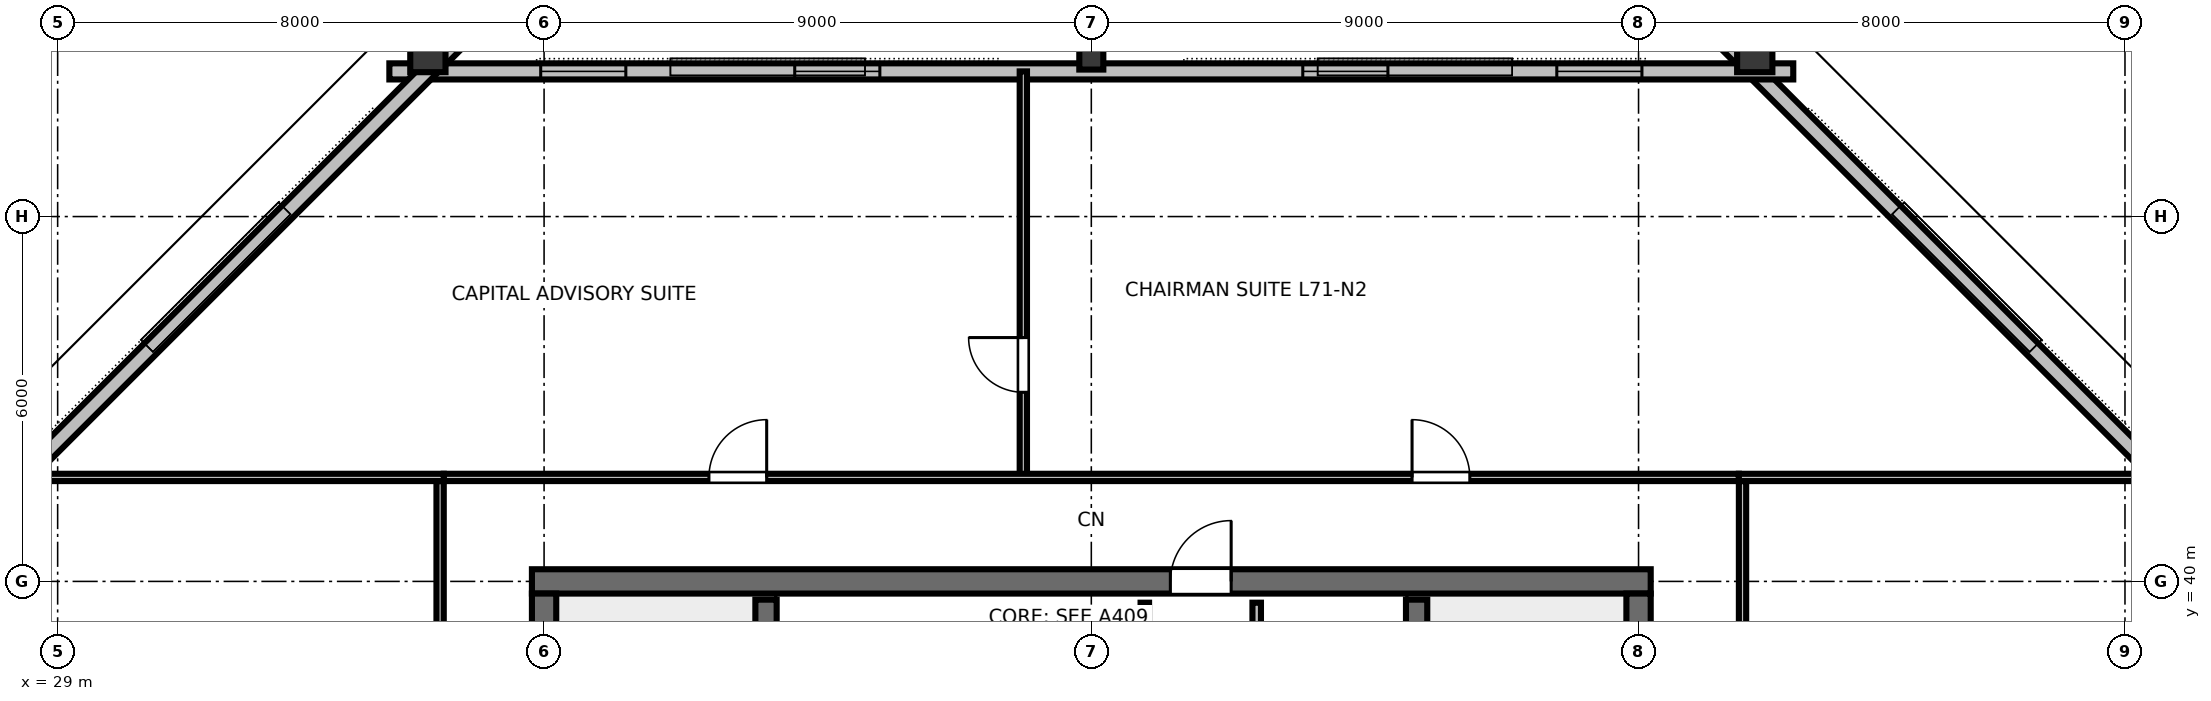
"""IFC4 building model, lengths in metres.
Left out: names, types, materials, properties, quantities, classifications, styles, units other than length and angle.
Written with IfcOpenShell. Run it as: python <this file> out.ifc"""

import sys

from ifc_helpers import new_model, si_unit, direction, frame, frame_2d, origin, origin_2d, place, context, subcontext, project, spatial, rectangle, hollow_rectangle, i_section, extrude, element, fill, save


model = new_model("IFC4")
c1 = context("Model", 3, precision=1e-05, world=origin(), true_north=direction((0.0, 1.0)))
c2 = subcontext(c1, "Body", "Model", "MODEL_VIEW")
j1 = project(units=[si_unit("LENGTHUNIT", "METRE"), si_unit("PLANEANGLEUNIT", "RADIAN")], contexts=[c1])
p1 = place(None, origin())
s1 = spatial("IfcSite", under=j1, at=p1, CompositionType="ELEMENT")
p2 = place(p1, origin())
s2 = spatial("IfcBuilding", under=s1, at=p2, CompositionType="ELEMENT")
p3 = place(p2, frame((0.0, 0.0, 268.2)))
s3 = spatial("IfcBuildingStorey", under=s2, at=p3, CompositionType="ELEMENT", Elevation=268.2)
p4 = place(p3, frame((36.8, 40.0, 0.0), z_axis=(0.0, 0.0, 1.0), x_axis=(1.0, 0.0, 0.0)))
e1 = element("IfcWall", 1, at=p4, inside=s3, PredefinedType="SHEAR", context=c2, shape_type="SweptSolid", body=[
    extrude(rectangle(XDim=18.4, YDim=0.4, at=frame_2d((9.2, 0.0))), origin(), (0.0, 0.0, 1.0), 3.36),
])
p5 = place(p4, frame((10.5, 0.0, 0.0)))
e2 = element("IfcOpeningElement", 2, at=p5, cuts=e1, PredefinedType="OPENING", context=c2, shape_type="SweptSolid", body=[
    extrude(rectangle(XDim=1.0, YDim=2.15, at=frame_2d((0.5, 1.075))), frame((0.0, 0.21, 0.0), z_axis=(0.0, -1.0, 0.0), x_axis=(1.0, 0.0, 0.0)), (0.0, 0.0, 1.0), 0.42),
])
p6 = place(p3, frame((37.0, 24.2, 0.0), z_axis=(0.0, 0.0, 1.0), x_axis=(0.0, 1.0, 0.0)))
e3 = element("IfcWall", 3, at=p6, inside=s3, PredefinedType="SHEAR", context=c2, shape_type="SweptSolid", body=[
    extrude(rectangle(XDim=15.6, YDim=0.4, at=frame_2d((7.8, 0.0))), origin(), (0.0, 0.0, 1.0), 3.36),
])
p7 = place(p6, frame((5.325, 0.0, 0.0)))
e4 = element("IfcOpeningElement", 4, at=p7, cuts=e3, PredefinedType="OPENING", context=c2, shape_type="SweptSolid", body=[
    extrude(rectangle(XDim=1.15, YDim=2.15, at=frame_2d((0.575, 1.075))), frame((0.0, 0.21, 0.0), z_axis=(0.0, -1.0, 0.0), x_axis=(1.0, 0.0, 0.0)), (0.0, 0.0, 1.0), 0.42),
])
p8 = place(p3, frame((55.0, 24.2, 0.0), z_axis=(0.0, 0.0, 1.0), x_axis=(0.0, 1.0, 0.0)))
e5 = element("IfcWall", 5, at=p8, inside=s3, PredefinedType="SHEAR", context=c2, shape_type="SweptSolid", body=[
    extrude(rectangle(XDim=15.6, YDim=0.4, at=frame_2d((7.8, 0.0))), origin(), (0.0, 0.0, 1.0), 3.36),
])
p9 = place(p8, frame((5.325, 0.0, 0.0)))
e6 = element("IfcOpeningElement", 6, at=p9, cuts=e5, PredefinedType="OPENING", context=c2, shape_type="SweptSolid", body=[
    extrude(rectangle(XDim=1.15, YDim=2.15, at=frame_2d((0.575, 1.075))), frame((0.0, 0.21, 0.0), z_axis=(0.0, -1.0, 0.0), x_axis=(1.0, 0.0, 0.0)), (0.0, 0.0, 1.0), 0.42),
])
p10 = place(p3, frame((64.086, 41.572, 0.0), z_axis=(-0.177666210098, -0.155370015085, 0.971748360535), x_axis=(0.731494530151, 0.639695731236, 0.236019329289)))
e7 = element("IfcColumn", 7, at=p10, inside=s3, PredefinedType="COLUMN", context=c2, shape_type="SweptSolid", body=[
    extrude(hollow_rectangle(XDim=0.58, YDim=0.7, WallThickness=0.032, at=origin_2d()), origin(), (0.0, 0.0, 1.0), 3.471),
])
p11 = place(p3, frame((56.911, 48.724, 0.0), z_axis=(-0.204686751755, -0.127630689066, 0.97047088615), x_axis=(0.529108691454, -0.848554059932, 0.0)))
e8 = element("IfcColumn", 8, at=p11, inside=s3, PredefinedType="COLUMN", context=c2, shape_type="SweptSolid", body=[
    extrude(hollow_rectangle(XDim=0.58, YDim=0.7, WallThickness=0.032, at=origin_2d()), origin(), (0.0, 0.0, 1.0), 3.476),
])
p12 = place(p3, frame((46.0, 48.607, 0.0), z_axis=(0.0, -0.128344855493, 0.99172959927), x_axis=(1.0, 0.0, 0.0)))
e9 = element("IfcColumn", 9, at=p12, inside=s3, PredefinedType="COLUMN", context=c2, shape_type="SweptSolid", body=[
    extrude(i_section(OverallWidth=0.395, OverallDepth=0.38, WebThickness=0.019, FlangeThickness=0.03, FilletRadius=0.025, at=origin_2d()), origin(), (0.0, 0.0, 1.0), 3.401),
])
p13 = place(p3, frame((35.089, 48.724, 0.0), z_axis=(0.204686751755, -0.127630689066, 0.97047088615), x_axis=(0.529108691454, 0.848554059932, 0.0)))
e10 = element("IfcColumn", 10, at=p13, inside=s3, PredefinedType="COLUMN", context=c2, shape_type="SweptSolid", body=[
    extrude(hollow_rectangle(XDim=0.58, YDim=0.7, WallThickness=0.032, at=origin_2d()), origin(), (0.0, 0.0, 1.0), 3.476),
])
p14 = place(p3, frame((27.914, 41.572, 0.0), z_axis=(0.177666210098, -0.155370015085, 0.971748360535), x_axis=(-0.731494530151, 0.639695731236, 0.236019329289)))
e11 = element("IfcColumn", 11, at=p14, inside=s3, PredefinedType="COLUMN", context=c2, shape_type="SweptSolid", body=[
    extrude(hollow_rectangle(XDim=0.58, YDim=0.7, WallThickness=0.032, at=origin_2d()), origin(), (0.0, 0.0, 1.0), 3.471),
])
p15 = place(p3, frame((64.228, 41.075, 0.0), z_axis=(0.0, 0.0, 1.0), x_axis=(-0.707106781187, 0.707106781187, 0.0)))
e12 = element("IfcWall", 12, at=p15, inside=s3, PredefinedType="STANDARD", context=c2, shape_type="SweptSolid", body=[
    extrude(rectangle(XDim=10.971, YDim=0.265, at=frame_2d((5.485, 0.0))), origin(), (0.0, 0.0, 1.0), 3.375),
])
p16 = place(p3, frame((57.544, 48.387, 0.0), z_axis=(0.0, 0.0, 1.0), x_axis=(-1.0, 0.0, 0.0)))
e13 = element("IfcWall", 13, at=p16, inside=s3, PredefinedType="STANDARD", context=c2, shape_type="SweptSolid", body=[
    extrude(rectangle(XDim=23.089, YDim=0.265, at=frame_2d((11.544, 0.0))), origin(), (0.0, 0.0, 1.0), 2.832),
])
p17 = place(p16, frame((2.489, 0.0, 0.85)))
e14 = element("IfcOpeningElement", 14, at=p17, cuts=e13, PredefinedType="OPENING", context=c2, shape_type="SweptSolid", body=[
    extrude(rectangle(XDim=1.4, YDim=1.2, at=frame_2d((0.7, 0.6))), frame((0.0, 0.142, 0.0), z_axis=(0.0, -1.0, 0.0), x_axis=(1.0, 0.0, 0.0)), (0.0, 0.0, 1.0), 0.285),
])
p18 = place(p16, frame((6.667, 0.0, 0.85)))
e15 = element("IfcOpeningElement", 15, at=p18, cuts=e13, PredefinedType="OPENING", context=c2, shape_type="SweptSolid", body=[
    extrude(rectangle(XDim=1.4, YDim=1.2, at=frame_2d((0.7, 0.6))), frame((0.0, 0.142, 0.0), z_axis=(0.0, -1.0, 0.0), x_axis=(1.0, 0.0, 0.0)), (0.0, 0.0, 1.0), 0.285),
])
p19 = place(p16, frame((15.022, 0.0, 0.85)))
e16 = element("IfcOpeningElement", 16, at=p19, cuts=e13, PredefinedType="OPENING", context=c2, shape_type="SweptSolid", body=[
    extrude(rectangle(XDim=1.4, YDim=1.2, at=frame_2d((0.7, 0.6))), frame((0.0, 0.142, 0.0), z_axis=(0.0, -1.0, 0.0), x_axis=(1.0, 0.0, 0.0)), (0.0, 0.0, 1.0), 0.285),
])
p20 = place(p16, frame((19.2, 0.0, 0.85)))
e17 = element("IfcOpeningElement", 17, at=p20, cuts=e13, PredefinedType="OPENING", context=c2, shape_type="SweptSolid", body=[
    extrude(rectangle(XDim=1.4, YDim=1.2, at=frame_2d((0.7, 0.6))), frame((0.0, 0.142, 0.0), z_axis=(0.0, -1.0, 0.0), x_axis=(1.0, 0.0, 0.0)), (0.0, 0.0, 1.0), 0.285),
])
p21 = place(p3, frame((35.53, 48.832, 0.0), z_axis=(0.0, 0.0, 1.0), x_axis=(-0.707106781187, -0.707106781187, 0.0)))
e18 = element("IfcWall", 18, at=p21, inside=s3, PredefinedType="STANDARD", context=c2, shape_type="SweptSolid", body=[
    extrude(rectangle(XDim=10.971, YDim=0.265, at=frame_2d((5.485, 0.0))), origin(), (0.0, 0.0, 1.0), 3.375),
])
for number, where, z_axis, x_axis in (
    (19, (40.65, 32.0, 0.0), (0.0, 0.0, 1.0), (0.0, 1.0, 0.0)),
    (20, (51.35, 32.0, 0.0), (0.0, 0.0, 1.0), (0.0, 1.0, 0.0)),
):
    element("IfcWall", number, at=place(p3, frame(where, z_axis=z_axis, x_axis=x_axis)), inside=s3, PredefinedType="SHEAR", context=c2, shape_type="SweptSolid", body=[
        extrude(rectangle(XDim=7.7, YDim=0.35, at=frame_2d((3.85, 0.0))), origin(), (0.0, 0.0, 1.0), 3.6),
    ])
p22 = place(p3, frame((46.88, 32.05, 0.0), z_axis=(0.0, 0.0, 1.0), x_axis=(0.0, 1.0, 0.0)))
e21 = element("IfcWall", 21, at=p22, inside=s3, PredefinedType="PARTITIONING", context=c2, shape_type="SweptSolid", body=[
    extrude(rectangle(XDim=7.6, YDim=0.14, at=frame_2d((3.8, 0.0))), origin(), (0.0, 0.0, 1.0), 3.375),
])
p23 = place(p22, frame((3.4, 0.0, 0.0)))
e22 = element("IfcOpeningElement", 22, at=p23, cuts=e21, PredefinedType="OPENING", context=c2, shape_type="SweptSolid", body=[
    extrude(rectangle(XDim=0.95, YDim=2.15, at=frame_2d((0.475, 1.075))), frame((0.0, 0.08, 0.0), z_axis=(0.0, -1.0, 0.0), x_axis=(1.0, 0.0, 0.0)), (0.0, 0.0, 1.0), 0.16),
])
p24 = place(p3, frame((48.72, 32.05, 0.0), z_axis=(0.0, 0.0, 1.0), x_axis=(0.0, 1.0, 0.0)))
e23 = element("IfcWall", 23, at=p24, inside=s3, PredefinedType="PARTITIONING", context=c2, shape_type="SweptSolid", body=[
    extrude(rectangle(XDim=7.6, YDim=0.14, at=frame_2d((3.8, 0.0))), origin(), (0.0, 0.0, 1.0), 3.375),
])
p25 = place(p24, frame((0.8, 0.0, 0.0)))
e24 = element("IfcOpeningElement", 24, at=p25, cuts=e23, PredefinedType="OPENING", context=c2, shape_type="SweptSolid", body=[
    extrude(rectangle(XDim=0.9, YDim=2.15, at=frame_2d((0.45, 1.075))), frame((0.0, 0.08, 0.0), z_axis=(0.0, -1.0, 0.0), x_axis=(1.0, 0.0, 0.0)), (0.0, 0.0, 1.0), 0.16),
])
p26 = place(p24, frame((3.35, 0.0, 0.0)))
e25 = element("IfcOpeningElement", 25, at=p26, cuts=e23, PredefinedType="OPENING", context=c2, shape_type="SweptSolid", body=[
    extrude(rectangle(XDim=0.9, YDim=2.15, at=frame_2d((0.45, 1.075))), frame((0.0, 0.08, 0.0), z_axis=(0.0, -1.0, 0.0), x_axis=(1.0, 0.0, 0.0)), (0.0, 0.0, 1.0), 0.16),
])
p27 = place(p24, frame((5.9, 0.0, 0.0)))
e26 = element("IfcOpeningElement", 26, at=p27, cuts=e23, PredefinedType="OPENING", context=c2, shape_type="SweptSolid", body=[
    extrude(rectangle(XDim=0.92, YDim=2.15, at=frame_2d((0.46, 1.075))), frame((0.0, 0.08, 0.0), z_axis=(0.0, -1.0, 0.0), x_axis=(1.0, 0.0, 0.0)), (0.0, 0.0, 1.0), 0.16),
])
p28 = place(p3, frame((44.882, 41.71, 0.0), z_axis=(0.0, 0.0, 1.0), x_axis=(0.0, 1.0, 0.0)))
e27 = element("IfcWall", 27, at=p28, inside=s3, PredefinedType="PARTITIONING", context=c2, shape_type="SweptSolid", body=[
    extrude(rectangle(XDim=6.677, YDim=0.12, at=frame_2d((3.339, 0.0))), origin(), (0.0, 0.0, 1.0), 2.655),
])
p29 = place(p28, frame((1.4, 0.0, 0.0)))
e28 = element("IfcOpeningElement", 28, at=p29, cuts=e27, PredefinedType="OPENING", context=c2, shape_type="SweptSolid", body=[
    extrude(rectangle(XDim=0.9, YDim=2.15, at=frame_2d((0.45, 1.075))), frame((0.0, 0.07, 0.0), z_axis=(0.0, -1.0, 0.0), x_axis=(1.0, 0.0, 0.0)), (0.0, 0.0, 1.0), 0.14),
])
p30 = place(p3, frame((35.35, 41.71, 0.0), z_axis=(0.0, 0.0, 1.0), x_axis=(1.0, 0.0, 0.0)))
e29 = element("IfcWall", 29, at=p30, inside=s3, PredefinedType="PARTITIONING", context=c2, shape_type="SweptSolid", body=[
    extrude(rectangle(XDim=21.3, YDim=0.12, at=frame_2d((10.65, 0.0))), origin(), (0.0, 0.0, 1.0), 2.655),
])
p31 = place(p30, frame((4.361, 0.0, 0.0)))
e30 = element("IfcOpeningElement", 30, at=p31, cuts=e29, PredefinedType="OPENING", context=c2, shape_type="SweptSolid", body=[
    extrude(rectangle(XDim=0.95, YDim=2.15, at=frame_2d((0.475, 1.075))), frame((0.0, 0.07, 0.0), z_axis=(0.0, -1.0, 0.0), x_axis=(1.0, 0.0, 0.0)), (0.0, 0.0, 1.0), 0.14),
])
p32 = place(p30, frame((15.925, 0.0, 0.0)))
e31 = element("IfcOpeningElement", 31, at=p32, cuts=e29, PredefinedType="OPENING", context=c2, shape_type="SweptSolid", body=[
    extrude(rectangle(XDim=0.95, YDim=2.15, at=frame_2d((0.475, 1.075))), frame((0.0, 0.07, 0.0), z_axis=(0.0, -1.0, 0.0), x_axis=(1.0, 0.0, 0.0)), (0.0, 0.0, 1.0), 0.14),
])
p33 = place(p3, frame((35.29, 22.35, 0.0), z_axis=(0.0, 0.0, 1.0), x_axis=(0.0, 1.0, 0.0)))
e32 = element("IfcWall", 32, at=p33, inside=s3, PredefinedType="PARTITIONING", context=c2, shape_type="SweptSolid", body=[
    extrude(rectangle(XDim=19.3, YDim=0.12, at=frame_2d((9.65, 0.0))), origin(), (0.0, 0.0, 1.0), 2.655),
])
p34 = place(p33, frame((2.847, 0.0, 0.0)))
e33 = element("IfcOpeningElement", 33, at=p34, cuts=e32, PredefinedType="OPENING", context=c2, shape_type="SweptSolid", body=[
    extrude(rectangle(XDim=0.95, YDim=2.15, at=frame_2d((0.475, 1.075))), frame((0.0, 0.07, 0.0), z_axis=(0.0, -1.0, 0.0), x_axis=(1.0, 0.0, 0.0)), (0.0, 0.0, 1.0), 0.14),
])
p35 = place(p33, frame((8.606, 0.0, 0.0)))
e34 = element("IfcOpeningElement", 34, at=p35, cuts=e32, PredefinedType="OPENING", context=c2, shape_type="SweptSolid", body=[
    extrude(rectangle(XDim=0.95, YDim=2.15, at=frame_2d((0.475, 1.075))), frame((0.0, 0.07, 0.0), z_axis=(0.0, -1.0, 0.0), x_axis=(1.0, 0.0, 0.0)), (0.0, 0.0, 1.0), 0.14),
])
p36 = place(p33, frame((14.935, 0.0, 0.0)))
e35 = element("IfcOpeningElement", 35, at=p36, cuts=e32, PredefinedType="OPENING", context=c2, shape_type="SweptSolid", body=[
    extrude(rectangle(XDim=0.95, YDim=2.15, at=frame_2d((0.475, 1.075))), frame((0.0, 0.07, 0.0), z_axis=(0.0, -1.0, 0.0), x_axis=(1.0, 0.0, 0.0)), (0.0, 0.0, 1.0), 0.14),
])
p37 = place(p3, frame((56.71, 22.35, 0.0), z_axis=(0.0, 0.0, 1.0), x_axis=(0.0, 1.0, 0.0)))
e36 = element("IfcWall", 36, at=p37, inside=s3, PredefinedType="PARTITIONING", context=c2, shape_type="SweptSolid", body=[
    extrude(rectangle(XDim=19.3, YDim=0.12, at=frame_2d((9.65, 0.0))), origin(), (0.0, 0.0, 1.0), 2.655),
])
p38 = place(p37, frame((3.646, 0.0, 0.0)))
e37 = element("IfcOpeningElement", 37, at=p38, cuts=e36, PredefinedType="OPENING", context=c2, shape_type="SweptSolid", body=[
    extrude(rectangle(XDim=0.95, YDim=2.15, at=frame_2d((0.475, 1.075))), frame((0.0, 0.07, 0.0), z_axis=(0.0, -1.0, 0.0), x_axis=(1.0, 0.0, 0.0)), (0.0, 0.0, 1.0), 0.14),
])
p39 = place(p37, frame((13.096, 0.0, 0.0)))
e38 = element("IfcOpeningElement", 38, at=p39, cuts=e36, PredefinedType="OPENING", context=c2, shape_type="SweptSolid", body=[
    extrude(rectangle(XDim=0.95, YDim=2.15, at=frame_2d((0.475, 1.075))), frame((0.0, 0.07, 0.0), z_axis=(0.0, -1.0, 0.0), x_axis=(1.0, 0.0, 0.0)), (0.0, 0.0, 1.0), 0.14),
])
for number, where, z_axis, x_axis in (
    (39, (35.35, 41.71, 0.0), (0.0, 0.0, 1.0), (-1.0, 0.0, 0.0)),
    (40, (56.65, 41.71, 0.0), (0.0, 0.0, 1.0), (1.0, 0.0, 0.0)),
):
    element("IfcWall", number, at=place(p3, frame(where, z_axis=z_axis, x_axis=x_axis)), inside=s3, PredefinedType="PARTITIONING", context=c2, shape_type="SweptSolid", body=[
        extrude(rectangle(XDim=6.942, YDim=0.12, at=frame_2d((3.471, 0.0))), origin(), (0.0, 0.0, 1.0), 2.655),
    ])
p40 = place(p17, origin())
e41 = element("IfcWindow", 41, at=p40, inside=s3, PartitioningType="SINGLE_PANEL", PredefinedType="WINDOW", context=c2, shape_type="SweptSolid", body=[
    extrude(rectangle(XDim=1.4, YDim=1.2, at=frame_2d((0.7, 0.6))), frame((0.0, 0.03, 0.0), z_axis=(0.0, -1.0, 0.0), x_axis=(1.0, 0.0, 0.0)), (0.0, 0.0, 1.0), 0.06),
])
fill(e14, e41)
p41 = place(p18, origin())
e42 = element("IfcWindow", 42, at=p41, inside=s3, PartitioningType="SINGLE_PANEL", PredefinedType="WINDOW", context=c2, shape_type="SweptSolid", body=[
    extrude(rectangle(XDim=1.4, YDim=1.2, at=frame_2d((0.7, 0.6))), frame((0.0, 0.03, 0.0), z_axis=(0.0, -1.0, 0.0), x_axis=(1.0, 0.0, 0.0)), (0.0, 0.0, 1.0), 0.06),
])
fill(e15, e42)
p42 = place(p19, origin())
e43 = element("IfcWindow", 43, at=p42, inside=s3, PartitioningType="SINGLE_PANEL", PredefinedType="WINDOW", context=c2, shape_type="SweptSolid", body=[
    extrude(rectangle(XDim=1.4, YDim=1.2, at=frame_2d((0.7, 0.6))), frame((0.0, 0.03, 0.0), z_axis=(0.0, -1.0, 0.0), x_axis=(1.0, 0.0, 0.0)), (0.0, 0.0, 1.0), 0.06),
])
fill(e16, e43)
p43 = place(p20, origin())
e44 = element("IfcWindow", 44, at=p43, inside=s3, PartitioningType="SINGLE_PANEL", PredefinedType="WINDOW", context=c2, shape_type="SweptSolid", body=[
    extrude(rectangle(XDim=1.4, YDim=1.2, at=frame_2d((0.7, 0.6))), frame((0.0, 0.03, 0.0), z_axis=(0.0, -1.0, 0.0), x_axis=(1.0, 0.0, 0.0)), (0.0, 0.0, 1.0), 0.06),
])
fill(e17, e44)
p44 = place(p5, origin())
e45 = element("IfcDoor", 45, at=p44, inside=s3, OperationType="SINGLE_SWING_RIGHT", PredefinedType="DOOR", context=c2, shape_type="SweptSolid", body=[
    extrude(rectangle(XDim=1.0, YDim=2.15, at=frame_2d((0.5, 1.075))), frame((0.0, 0.025, 0.0), z_axis=(0.0, -1.0, 0.0), x_axis=(1.0, 0.0, 0.0)), (0.0, 0.0, 1.0), 0.05),
])
fill(e2, e45)
p45 = place(p29, origin())
e46 = element("IfcDoor", 46, at=p45, inside=s3, OperationType="SINGLE_SWING_RIGHT", PredefinedType="DOOR", context=c2, shape_type="SweptSolid", body=[
    extrude(rectangle(XDim=0.9, YDim=2.15, at=frame_2d((0.45, 1.075))), frame((0.0, 0.025, 0.0), z_axis=(0.0, -1.0, 0.0), x_axis=(1.0, 0.0, 0.0)), (0.0, 0.0, 1.0), 0.05),
])
fill(e28, e46)
p46 = place(p31, origin())
e47 = element("IfcDoor", 47, at=p46, inside=s3, OperationType="SINGLE_SWING_RIGHT", PredefinedType="DOOR", context=c2, shape_type="SweptSolid", body=[
    extrude(rectangle(XDim=0.95, YDim=2.15, at=frame_2d((0.475, 1.075))), frame((0.0, 0.025, 0.0), z_axis=(0.0, -1.0, 0.0), x_axis=(1.0, 0.0, 0.0)), (0.0, 0.0, 1.0), 0.05),
])
fill(e30, e47)
p47 = place(p32, origin())
e48 = element("IfcDoor", 48, at=p47, inside=s3, OperationType="SINGLE_SWING_LEFT", PredefinedType="DOOR", context=c2, shape_type="SweptSolid", body=[
    extrude(rectangle(XDim=0.95, YDim=2.15, at=frame_2d((0.475, 1.075))), frame((0.0, 0.025, 0.0), z_axis=(0.0, -1.0, 0.0), x_axis=(1.0, 0.0, 0.0)), (0.0, 0.0, 1.0), 0.05),
])
fill(e31, e48)
save(model, sys.argv[1])
